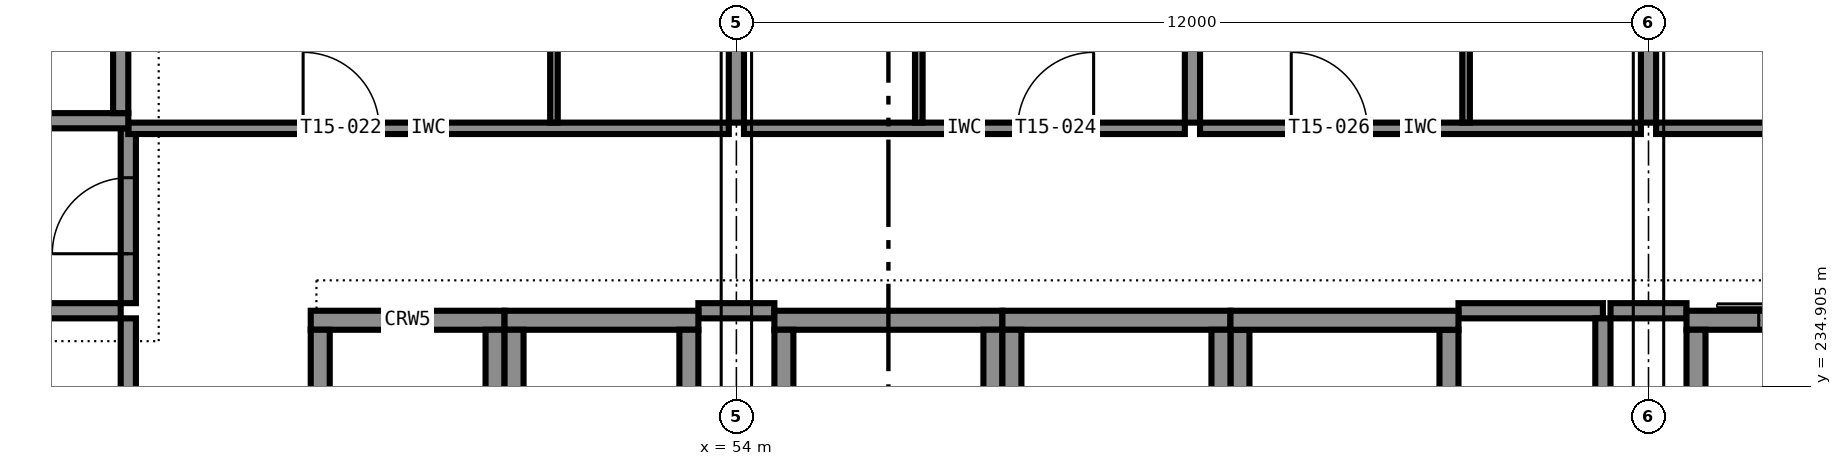
"""IFC4 building model, lengths in metres.
Left out: names, types, materials, properties, quantities, classifications, styles, units other than length and angle.
Written with IfcOpenShell. Run it as: python <this file> out.ifc"""

import sys

from ifc_helpers import new_model, si_unit, direction, frame, frame_2d, origin, place, context, subcontext, project, spatial, rectangle, extrude, element, fill, save


model = new_model("IFC4")
c1 = context("Model", 3, precision=1e-05, world=origin(), true_north=direction((0.0, 1.0)))
c2 = subcontext(c1, "Body", "Model", "MODEL_VIEW")
j1 = project(units=[si_unit("LENGTHUNIT", "METRE"), si_unit("PLANEANGLEUNIT", "RADIAN")], contexts=[c1])
p1 = place(None, origin())
s1 = spatial("IfcSite", under=j1, at=p1, CompositionType="ELEMENT")
p2 = place(p1, origin())
s2 = spatial("IfcBuilding", under=s1, at=p2, CompositionType="ELEMENT")
p3 = place(p2, frame((0.0, 0.0, 60.6)))
s3 = spatial("IfcBuildingStorey", under=s2, at=p3, CompositionType="ELEMENT", Elevation=60.6)
p4 = place(p3, frame((54.5, 235.775, 0.0), z_axis=(0.0, 0.0, 1.0), x_axis=(1.0, 0.0, 0.0)))
e1 = element("IfcWall", 1, at=p4, inside=s3, PredefinedType="SHEAR", context=c2, shape_type="SweptSolid", body=[
    extrude(rectangle(XDim=3.0, YDim=0.25, at=frame_2d((1.5, 0.0))), origin(), (0.0, 0.0, 1.0), 3.6),
])
for number, where, z_axis, x_axis in (
    (2, (54.625, 232.35, 0.0), (0.0, 0.0, 1.0), (0.0, 1.0, 0.0)),
    (3, (57.375, 232.35, 0.0), (0.0, 0.0, 1.0), (0.0, 1.0, 0.0)),
):
    element("IfcWall", number, at=place(p3, frame(where, z_axis=z_axis, x_axis=x_axis)), inside=s3, PredefinedType="SHEAR", context=c2, shape_type="SweptSolid", body=[
        extrude(rectangle(XDim=3.3, YDim=0.25, at=frame_2d((1.65, 0.0))), origin(), (0.0, 0.0, 1.0), 3.6),
    ])
p5 = place(p3, frame((57.5, 235.775, 0.0), z_axis=(0.0, 0.0, 1.0), x_axis=(1.0, 0.0, 0.0)))
e4 = element("IfcWall", 4, at=p5, inside=s3, PredefinedType="SHEAR", context=c2, shape_type="SweptSolid", body=[
    extrude(rectangle(XDim=3.0, YDim=0.25, at=frame_2d((1.5, 0.0))), origin(), (0.0, 0.0, 1.0), 3.6),
])
for number, where, z_axis, x_axis in (
    (5, (57.625, 232.35, 0.0), (0.0, 0.0, 1.0), (0.0, 1.0, 0.0)),
    (6, (60.375, 232.35, 0.0), (0.0, 0.0, 1.0), (0.0, 1.0, 0.0)),
):
    element("IfcWall", number, at=place(p3, frame(where, z_axis=z_axis, x_axis=x_axis)), inside=s3, PredefinedType="SHEAR", context=c2, shape_type="SweptSolid", body=[
        extrude(rectangle(XDim=3.3, YDim=0.25, at=frame_2d((1.65, 0.0))), origin(), (0.0, 0.0, 1.0), 3.6),
    ])
p6 = place(p3, frame((60.5, 235.775, 0.0), z_axis=(0.0, 0.0, 1.0), x_axis=(1.0, 0.0, 0.0)))
e7 = element("IfcWall", 7, at=p6, inside=s3, PredefinedType="SHEAR", context=c2, shape_type="SweptSolid", body=[
    extrude(rectangle(XDim=3.0, YDim=0.25, at=frame_2d((1.5, 0.0))), origin(), (0.0, 0.0, 1.0), 3.6),
])
for number, where, z_axis, x_axis in (
    (8, (60.625, 232.35, 0.0), (0.0, 0.0, 1.0), (0.0, 1.0, 0.0)),
    (9, (63.375, 232.35, 0.0), (0.0, 0.0, 1.0), (0.0, 1.0, 0.0)),
):
    element("IfcWall", number, at=place(p3, frame(where, z_axis=z_axis, x_axis=x_axis)), inside=s3, PredefinedType="SHEAR", context=c2, shape_type="SweptSolid", body=[
        extrude(rectangle(XDim=3.3, YDim=0.25, at=frame_2d((1.65, 0.0))), origin(), (0.0, 0.0, 1.0), 3.6),
    ])
p7 = place(p3, frame((66.5, 235.775, 0.0), z_axis=(0.0, 0.0, 1.0), x_axis=(1.0, 0.0, 0.0)))
e10 = element("IfcWall", 10, at=p7, inside=s3, PredefinedType="SHEAR", context=c2, shape_type="SweptSolid", body=[
    extrude(rectangle(XDim=3.0, YDim=0.25, at=frame_2d((1.5, 0.0))), origin(), (0.0, 0.0, 1.0), 3.6),
])
p8 = place(p7, frame((0.95, 0.0, 0.0)))
e11 = element("IfcOpeningElement", 11, at=p8, cuts=e10, PredefinedType="OPENING", context=c2, shape_type="SweptSolid", body=[
    extrude(rectangle(XDim=1.1, YDim=2.1, at=frame_2d((0.55, 1.05))), frame((0.0, 0.135, 0.0), z_axis=(0.0, -1.0, 0.0), x_axis=(1.0, 0.0, 0.0)), (0.0, 0.0, 1.0), 0.27),
])
p9 = place(p3, frame((66.625, 232.35, 0.0), z_axis=(0.0, 0.0, 1.0), x_axis=(0.0, 1.0, 0.0)))
e12 = element("IfcWall", 12, at=p9, inside=s3, PredefinedType="SHEAR", context=c2, shape_type="SweptSolid", body=[
    extrude(rectangle(XDim=3.3, YDim=0.25, at=frame_2d((1.65, 0.0))), origin(), (0.0, 0.0, 1.0), 3.6),
])
p10 = place(p3, frame((48.4, 235.775, 0.0), z_axis=(0.0, 0.0, 1.0), x_axis=(1.0, 0.0, 0.0)))
e13 = element("IfcWall", 13, at=p10, inside=s3, PredefinedType="SHEAR", context=c2, shape_type="SweptSolid", body=[
    extrude(rectangle(XDim=2.55, YDim=0.25, at=frame_2d((1.275, 0.0))), origin(), (0.0, 0.0, 1.0), 3.6),
])
for number, where, z_axis, x_axis in (
    (14, (48.525, 232.35, 0.0), (0.0, 0.0, 1.0), (0.0, 1.0, 0.0)),
    (15, (50.825, 232.35, 0.0), (0.0, 0.0, 1.0), (0.0, 1.0, 0.0)),
):
    element("IfcWall", number, at=place(p3, frame(where, z_axis=z_axis, x_axis=x_axis)), inside=s3, PredefinedType="SHEAR", context=c2, shape_type="SweptSolid", body=[
        extrude(rectangle(XDim=3.3, YDim=0.25, at=frame_2d((1.65, 0.0))), origin(), (0.0, 0.0, 1.0), 3.6),
    ])
p11 = place(p3, frame((50.95, 235.775, 0.0), z_axis=(0.0, 0.0, 1.0), x_axis=(1.0, 0.0, 0.0)))
e16 = element("IfcWall", 16, at=p11, inside=s3, PredefinedType="SHEAR", context=c2, shape_type="SweptSolid", body=[
    extrude(rectangle(XDim=2.55, YDim=0.25, at=frame_2d((1.275, 0.0))), origin(), (0.0, 0.0, 1.0), 3.6),
])
for number, where, z_axis, x_axis in (
    (17, (51.075, 232.35, 0.0), (0.0, 0.0, 1.0), (0.0, 1.0, 0.0)),
    (18, (53.375, 232.35, 0.0), (0.0, 0.0, 1.0), (0.0, 1.0, 0.0)),
):
    element("IfcWall", number, at=place(p3, frame(where, z_axis=z_axis, x_axis=x_axis)), inside=s3, PredefinedType="SHEAR", context=c2, shape_type="SweptSolid", body=[
        extrude(rectangle(XDim=3.3, YDim=0.25, at=frame_2d((1.65, 0.0))), origin(), (0.0, 0.0, 1.0), 3.6),
    ])
p12 = place(p3, frame((42.5, 238.4, 0.0), z_axis=(0.0, 0.0, 1.0), x_axis=(1.0, 0.0, 0.0)))
e19 = element("IfcWall", 19, at=p12, inside=s3, PredefinedType="SHEAR", context=c2, shape_type="SweptSolid", body=[
    extrude(rectangle(XDim=3.5, YDim=0.2, at=frame_2d((1.75, 0.0))), origin(), (0.0, 0.0, 1.0), 3.6),
])
p13 = place(p12, frame((1.15, 0.0, 0.0)))
e20 = element("IfcOpeningElement", 20, at=p13, cuts=e19, PredefinedType="OPENING", context=c2, shape_type="SweptSolid", body=[
    extrude(rectangle(XDim=1.2, YDim=2.1, at=frame_2d((0.6, 1.05))), frame((0.0, 0.11, 0.0), z_axis=(0.0, -1.0, 0.0), x_axis=(1.0, 0.0, 0.0)), (0.0, 0.0, 1.0), 0.22),
])
p14 = place(p3, frame((45.9, 238.5, 0.0), z_axis=(0.0, 0.0, 1.0), x_axis=(0.0, 1.0, 0.0)))
e21 = element("IfcWall", 21, at=p14, inside=s3, PredefinedType="SHEAR", context=c2, shape_type="SweptSolid", body=[
    extrude(rectangle(XDim=7.0, YDim=0.2, at=frame_2d((3.5, 0.0))), origin(), (0.0, 0.0, 1.0), 3.6),
])
p15 = place(p3, frame((42.3, 235.9, 0.0), z_axis=(0.0, 0.0, 1.0), x_axis=(1.0, 0.0, 0.0)))
e22 = element("IfcWall", 22, at=p15, inside=s3, PredefinedType="PARTITIONING", context=c2, shape_type="SweptSolid", body=[
    extrude(rectangle(XDim=3.6, YDim=0.2, at=frame_2d((1.8, 0.0))), origin(), (0.0, 0.0, 1.0), 3.4),
])
p16 = place(p3, frame((53.5, 235.9, 0.0), z_axis=(0.0, 0.0, 1.0), x_axis=(1.0, 0.0, 0.0)))
e23 = element("IfcWall", 23, at=p16, inside=s3, PredefinedType="PARTITIONING", context=c2, shape_type="SweptSolid", body=[
    extrude(rectangle(XDim=1.0, YDim=0.2, at=frame_2d((0.5, 0.0))), origin(), (0.0, 0.0, 1.0), 3.4),
])
p17 = place(p3, frame((63.5, 235.9, 0.0), z_axis=(0.0, 0.0, 1.0), x_axis=(1.0, 0.0, 0.0)))
e24 = element("IfcWall", 24, at=p17, inside=s3, PredefinedType="PARTITIONING", context=c2, shape_type="SweptSolid", body=[
    extrude(rectangle(XDim=1.9, YDim=0.2, at=frame_2d((0.95, 0.0))), origin(), (0.0, 0.0, 1.0), 3.4),
])
p18 = place(p3, frame((65.5, 235.9, 0.0), z_axis=(0.0, 0.0, 1.0), x_axis=(1.0, 0.0, 0.0)))
e25 = element("IfcWall", 25, at=p18, inside=s3, PredefinedType="PARTITIONING", context=c2, shape_type="SweptSolid", body=[
    extrude(rectangle(XDim=1.0, YDim=0.2, at=frame_2d((0.5, 0.0))), origin(), (0.0, 0.0, 1.0), 3.4),
])
p19 = place(p3, frame((46.0, 232.2, 0.0), z_axis=(0.0, 0.0, 1.0), x_axis=(0.0, 1.0, 0.0)))
e26 = element("IfcWall", 26, at=p19, inside=s3, PredefinedType="PARTITIONING", context=c2, shape_type="SweptSolid", body=[
    extrude(rectangle(XDim=3.6, YDim=0.2, at=frame_2d((1.8, 0.0))), origin(), (0.0, 0.0, 1.0), 3.4),
])
p20 = place(p19, frame((1.35, 0.0, 0.0)))
e27 = element("IfcOpeningElement", 27, at=p20, cuts=e26, PredefinedType="OPENING", context=c2, shape_type="SweptSolid", body=[
    extrude(rectangle(XDim=0.9, YDim=2.1, at=frame_2d((0.45, 1.05))), frame((0.0, 0.11, 0.0), z_axis=(0.0, -1.0, 0.0), x_axis=(1.0, 0.0, 0.0)), (0.0, 0.0, 1.0), 0.22),
])
p21 = place(p3, frame((46.0, 236.0, 0.0), z_axis=(0.0, 0.0, 1.0), x_axis=(0.0, 1.0, 0.0)))
e28 = element("IfcWall", 28, at=p21, inside=s3, PredefinedType="PARTITIONING", context=c2, shape_type="SweptSolid", body=[
    extrude(rectangle(XDim=2.3, YDim=0.2, at=frame_2d((1.15, 0.0))), origin(), (0.0, 0.0, 1.0), 3.4),
])
p22 = place(p21, frame((0.65, 0.0, 0.0)))
e29 = element("IfcOpeningElement", 29, at=p22, cuts=e28, PredefinedType="OPENING", context=c2, shape_type="SweptSolid", body=[
    extrude(rectangle(XDim=1.0, YDim=2.1, at=frame_2d((0.5, 1.05))), frame((0.0, 0.11, 0.0), z_axis=(0.0, -1.0, 0.0), x_axis=(1.0, 0.0, 0.0)), (0.0, 0.0, 1.0), 0.22),
])
p23 = place(p3, frame((65.4, 232.2, 0.0), z_axis=(0.0, 0.0, 1.0), x_axis=(0.0, 1.0, 0.0)))
e30 = element("IfcWall", 30, at=p23, inside=s3, PredefinedType="PARTITIONING", context=c2, shape_type="SweptSolid", body=[
    extrude(rectangle(XDim=3.6, YDim=0.2, at=frame_2d((1.8, 0.0))), origin(), (0.0, 0.0, 1.0), 3.4),
])
p24 = place(p3, frame((46.0, 238.3, 0.0), z_axis=(0.0, 0.0, 1.0), x_axis=(1.0, 0.0, 0.0)))
e31 = element("IfcWall", 31, at=p24, inside=s3, PredefinedType="PARTITIONING", context=c2, shape_type="SweptSolid", body=[
    extrude(rectangle(XDim=7.9, YDim=0.15, at=frame_2d((3.95, 0.0))), origin(), (0.0, 0.0, 1.0), 3.4),
])
p25 = place(p24, frame((2.3, 0.0, 0.0)))
e32 = element("IfcOpeningElement", 32, at=p25, cuts=e31, PredefinedType="OPENING", context=c2, shape_type="SweptSolid", body=[
    extrude(rectangle(XDim=1.0, YDim=2.1, at=frame_2d((0.5, 1.05))), frame((0.0, 0.085, 0.0), z_axis=(0.0, -1.0, 0.0), x_axis=(1.0, 0.0, 0.0)), (0.0, 0.0, 1.0), 0.17),
])
p26 = place(p3, frame((51.6, 238.375, 0.0), z_axis=(0.0, 0.0, 1.0), x_axis=(0.0, 1.0, 0.0)))
e33 = element("IfcWall", 33, at=p26, inside=s3, PredefinedType="PARTITIONING", context=c2, shape_type="SweptSolid", body=[
    extrude(rectangle(XDim=2.875, YDim=0.1, at=frame_2d((1.438, 0.0))), origin(), (0.0, 0.0, 1.0), 3.4),
])
p27 = place(p26, frame((1.038, 0.0, 0.0)))
e34 = element("IfcOpeningElement", 34, at=p27, cuts=e33, PredefinedType="OPENING", context=c2, shape_type="SweptSolid", body=[
    extrude(rectangle(XDim=0.8, YDim=2.1, at=frame_2d((0.4, 1.05))), frame((0.0, 0.06, 0.0), z_axis=(0.0, -1.0, 0.0), x_axis=(1.0, 0.0, 0.0)), (0.0, 0.0, 1.0), 0.12),
])
p28 = place(p3, frame((54.1, 238.3, 0.0), z_axis=(0.0, 0.0, 1.0), x_axis=(1.0, 0.0, 0.0)))
e35 = element("IfcWall", 35, at=p28, inside=s3, PredefinedType="PARTITIONING", context=c2, shape_type="SweptSolid", body=[
    extrude(rectangle(XDim=5.8, YDim=0.15, at=frame_2d((2.9, 0.0))), origin(), (0.0, 0.0, 1.0), 3.4),
])
p29 = place(p28, frame((3.6, 0.0, 0.0)))
e36 = element("IfcOpeningElement", 36, at=p29, cuts=e35, PredefinedType="OPENING", context=c2, shape_type="SweptSolid", body=[
    extrude(rectangle(XDim=1.0, YDim=2.1, at=frame_2d((0.5, 1.05))), frame((0.0, 0.085, 0.0), z_axis=(0.0, -1.0, 0.0), x_axis=(1.0, 0.0, 0.0)), (0.0, 0.0, 1.0), 0.17),
])
p30 = place(p3, frame((56.4, 241.25, 0.0), z_axis=(0.0, 0.0, 1.0), x_axis=(0.0, -1.0, 0.0)))
e37 = element("IfcWall", 37, at=p30, inside=s3, PredefinedType="PARTITIONING", context=c2, shape_type="SweptSolid", body=[
    extrude(rectangle(XDim=2.875, YDim=0.1, at=frame_2d((1.438, 0.0))), origin(), (0.0, 0.0, 1.0), 3.4),
])
p31 = place(p30, frame((1.038, 0.0, 0.0)))
e38 = element("IfcOpeningElement", 38, at=p31, cuts=e37, PredefinedType="OPENING", context=c2, shape_type="SweptSolid", body=[
    extrude(rectangle(XDim=0.8, YDim=2.1, at=frame_2d((0.4, 1.05))), frame((0.0, 0.06, 0.0), z_axis=(0.0, -1.0, 0.0), x_axis=(1.0, 0.0, 0.0)), (0.0, 0.0, 1.0), 0.12),
])
p32 = place(p3, frame((60.1, 238.3, 0.0), z_axis=(0.0, 0.0, 1.0), x_axis=(1.0, 0.0, 0.0)))
e39 = element("IfcWall", 39, at=p32, inside=s3, PredefinedType="PARTITIONING", context=c2, shape_type="SweptSolid", body=[
    extrude(rectangle(XDim=5.8, YDim=0.15, at=frame_2d((2.9, 0.0))), origin(), (0.0, 0.0, 1.0), 3.4),
])
p33 = place(p32, frame((1.2, 0.0, 0.0)))
e40 = element("IfcOpeningElement", 40, at=p33, cuts=e39, PredefinedType="OPENING", context=c2, shape_type="SweptSolid", body=[
    extrude(rectangle(XDim=1.0, YDim=2.1, at=frame_2d((0.5, 1.05))), frame((0.0, 0.085, 0.0), z_axis=(0.0, -1.0, 0.0), x_axis=(1.0, 0.0, 0.0)), (0.0, 0.0, 1.0), 0.17),
])
p34 = place(p3, frame((63.6, 238.375, 0.0), z_axis=(0.0, 0.0, 1.0), x_axis=(0.0, 1.0, 0.0)))
e41 = element("IfcWall", 41, at=p34, inside=s3, PredefinedType="PARTITIONING", context=c2, shape_type="SweptSolid", body=[
    extrude(rectangle(XDim=2.875, YDim=0.1, at=frame_2d((1.438, 0.0))), origin(), (0.0, 0.0, 1.0), 3.4),
])
p35 = place(p34, frame((1.038, 0.0, 0.0)))
e42 = element("IfcOpeningElement", 42, at=p35, cuts=e41, PredefinedType="OPENING", context=c2, shape_type="SweptSolid", body=[
    extrude(rectangle(XDim=0.8, YDim=2.1, at=frame_2d((0.4, 1.05))), frame((0.0, 0.06, 0.0), z_axis=(0.0, -1.0, 0.0), x_axis=(1.0, 0.0, 0.0)), (0.0, 0.0, 1.0), 0.12),
])
p36 = place(p3, frame((66.1, 238.3, 0.0), z_axis=(0.0, 0.0, 1.0), x_axis=(1.0, 0.0, 0.0)))
e43 = element("IfcWall", 43, at=p36, inside=s3, PredefinedType="PARTITIONING", context=c2, shape_type="SweptSolid", body=[
    extrude(rectangle(XDim=5.8, YDim=0.15, at=frame_2d((2.9, 0.0))), origin(), (0.0, 0.0, 1.0), 3.4),
])
p37 = place(p36, frame((3.6, 0.0, 0.0)))
e44 = element("IfcOpeningElement", 44, at=p37, cuts=e43, PredefinedType="OPENING", context=c2, shape_type="SweptSolid", body=[
    extrude(rectangle(XDim=1.0, YDim=2.1, at=frame_2d((0.5, 1.05))), frame((0.0, 0.085, 0.0), z_axis=(0.0, -1.0, 0.0), x_axis=(1.0, 0.0, 0.0)), (0.0, 0.0, 1.0), 0.17),
])
p38 = place(p3, frame((54.0, 245.65, 0.0), z_axis=(0.0, 0.0, 1.0), x_axis=(0.0, -1.0, 0.0)))
e45 = element("IfcWall", 45, at=p38, inside=s3, PredefinedType="PARTITIONING", context=c2, shape_type="SweptSolid", body=[
    extrude(rectangle(XDim=7.275, YDim=0.2, at=frame_2d((3.637, 0.0))), origin(), (0.0, 0.0, 1.0), 2.6),
])
p39 = place(p3, frame((60.0, 245.7, 0.0), z_axis=(0.0, 0.0, 1.0), x_axis=(0.0, -1.0, 0.0)))
e46 = element("IfcWall", 46, at=p39, inside=s3, PredefinedType="PARTITIONING", context=c2, shape_type="SweptSolid", body=[
    extrude(rectangle(XDim=7.325, YDim=0.2, at=frame_2d((3.663, 0.0))), origin(), (0.0, 0.0, 1.0), 3.4),
])
p40 = place(p3, frame((66.0, 245.65, 0.0), z_axis=(0.0, 0.0, 1.0), x_axis=(0.0, -1.0, 0.0)))
e47 = element("IfcWall", 47, at=p40, inside=s3, PredefinedType="PARTITIONING", context=c2, shape_type="SweptSolid", body=[
    extrude(rectangle(XDim=7.275, YDim=0.2, at=frame_2d((3.637, 0.0))), origin(), (0.0, 0.0, 1.0), 2.6),
])
p41 = place(p22, origin())
e48 = element("IfcDoor", 48, at=p41, inside=s3, OperationType="SINGLE_SWING_LEFT", PredefinedType="DOOR", context=c2, shape_type="SweptSolid", body=[
    extrude(rectangle(XDim=1.0, YDim=2.1, at=frame_2d((0.5, 1.05))), frame((0.0, 0.025, 0.0), z_axis=(0.0, -1.0, 0.0), x_axis=(1.0, 0.0, 0.0)), (0.0, 0.0, 1.0), 0.05),
])
fill(e29, e48)
p42 = place(p25, origin())
e49 = element("IfcDoor", 49, at=p42, inside=s3, OperationType="SINGLE_SWING_LEFT", PredefinedType="DOOR", context=c2, shape_type="SweptSolid", body=[
    extrude(rectangle(XDim=1.0, YDim=2.1, at=frame_2d((0.5, 1.05))), frame((0.0, 0.025, 0.0), z_axis=(0.0, -1.0, 0.0), x_axis=(1.0, 0.0, 0.0)), (0.0, 0.0, 1.0), 0.05),
])
fill(e32, e49)
p43 = place(p29, origin())
e50 = element("IfcDoor", 50, at=p43, inside=s3, OperationType="SINGLE_SWING_RIGHT", PredefinedType="DOOR", context=c2, shape_type="SweptSolid", body=[
    extrude(rectangle(XDim=1.0, YDim=2.1, at=frame_2d((0.5, 1.05))), frame((0.0, 0.025, 0.0), z_axis=(0.0, -1.0, 0.0), x_axis=(1.0, 0.0, 0.0)), (0.0, 0.0, 1.0), 0.05),
])
fill(e36, e50)
p44 = place(p33, origin())
e51 = element("IfcDoor", 51, at=p44, inside=s3, OperationType="SINGLE_SWING_LEFT", PredefinedType="DOOR", context=c2, shape_type="SweptSolid", body=[
    extrude(rectangle(XDim=1.0, YDim=2.1, at=frame_2d((0.5, 1.05))), frame((0.0, 0.025, 0.0), z_axis=(0.0, -1.0, 0.0), x_axis=(1.0, 0.0, 0.0)), (0.0, 0.0, 1.0), 0.05),
])
fill(e40, e51)
p45 = place(p8, origin())
e52 = element("IfcDoor", 52, at=p45, inside=s3, OperationType="SLIDING_TO_LEFT", PredefinedType="DOOR", context=c2, shape_type="SweptSolid", body=[
    extrude(rectangle(XDim=1.1, YDim=2.1, at=frame_2d((0.55, 1.05))), frame((0.0, 0.025, 0.0), z_axis=(0.0, -1.0, 0.0), x_axis=(1.0, 0.0, 0.0)), (0.0, 0.0, 1.0), 0.05),
])
fill(e11, e52)
save(model, sys.argv[1])
